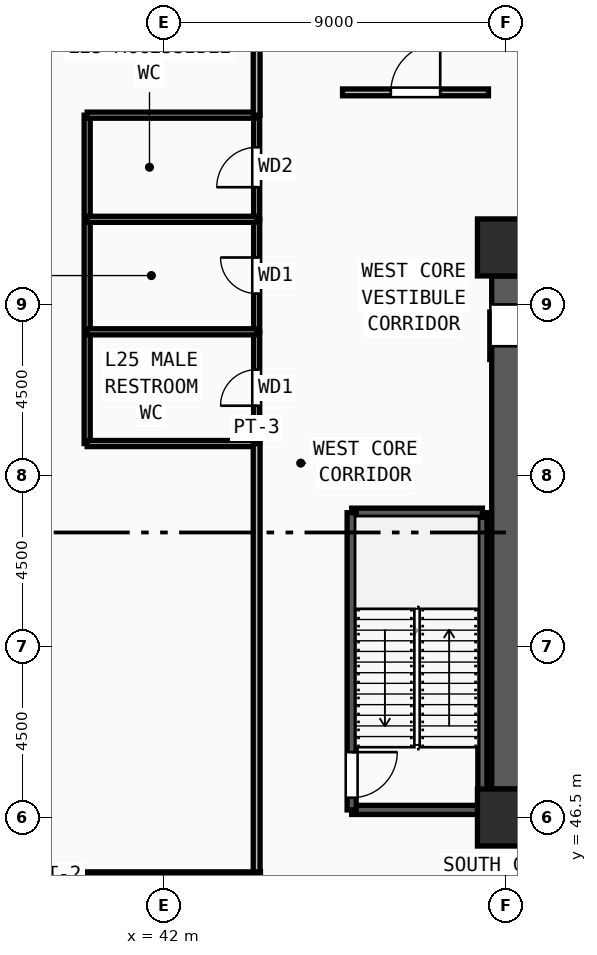
"""IFC4 building model, lengths in metres.
Left out: names, types, materials, properties, quantities, classifications, styles, units other than length and angle.
Written with IfcOpenShell. Run it as: python <this file> out.ifc"""

import sys

from ifc_helpers import new_model, si_unit, direction, frame, frame_2d, origin, origin_2d, place, context, subcontext, project, spatial, rectangle, extrude, source, transform, mapped, element, fill, save


model = new_model("IFC4")
c1 = context("Model", 3, precision=1e-05, world=origin(), true_north=direction((0.0, 1.0)))
c2 = subcontext(c1, "Body", "Model", "MODEL_VIEW")
j1 = project(units=[si_unit("LENGTHUNIT", "METRE"), si_unit("PLANEANGLEUNIT", "RADIAN")], contexts=[c1])
p1 = place(None, origin())
s1 = spatial("IfcSite", under=j1, at=p1, CompositionType="ELEMENT")
p2 = place(p1, origin())
s2 = spatial("IfcBuilding", under=s1, at=p2, CompositionType="ELEMENT")
p3 = place(p2, frame((0.0, 0.0, 97.5)))
s3 = spatial("IfcBuildingStorey", under=s2, at=p3, CompositionType="ELEMENT", Elevation=97.5)
m1 = source(origin(), c2, "Body", "SweptSolid", [
    extrude(rectangle(XDim=1.5, YDim=1.5, at=origin_2d()), origin(), (0.0, 0.0, 1.0), 4.5),
])
for number, where, z_axis, x_axis in (
    (1, (51.0, 46.5, 0.0), (0.0, 0.0, 1.0), (1.0, 0.0, 0.0)),
    (2, (51.0, 61.5, 0.0), (0.0, 0.0, 1.0), (1.0, 0.0, 0.0)),
):
    element("IfcColumn", number, at=place(p3, frame(where, z_axis=z_axis, x_axis=x_axis)), inside=s3, PredefinedType="COLUMN", context=c2, shape_type="MappedRepresentation", body=[
        mapped(m1, transform((0.0, 0.0, 0.0), x_axis=(1.0, 0.0, 0.0), y_axis=(0.0, 1.0, 0.0), z_axis=(0.0, 0.0, 1.0), scale=1.0)),
    ])
p4 = place(p3, frame((51.0, 47.25, 0.0), z_axis=(0.0, 0.0, 1.0), x_axis=(0.0, 1.0, 0.0)))
e3 = element("IfcWall", 3, at=p4, inside=s3, PredefinedType="SHEAR", context=c2, shape_type="SweptSolid", body=[
    extrude(rectangle(XDim=13.5, YDim=0.75, at=frame_2d((6.75, 0.0))), origin(), (0.0, 0.0, 1.0), 4.32),
])
m2 = source(origin(), c2, "Body", "SweptSolid", [
    extrude(rectangle(XDim=1.1, YDim=2.2, at=frame_2d((0.55, 1.1))), frame((0.0, 0.385, 0.0), z_axis=(0.0, -1.0, 0.0), x_axis=(1.0, 0.0, 0.0)), (0.0, 0.0, 1.0), 0.77),
])
p5 = place(p4, frame((11.65, 0.0, 0.0)))
e4 = element("IfcOpeningElement", 4, at=p5, cuts=e3, PredefinedType="OPENING", context=c2, shape_type="MappedRepresentation", body=[
    mapped(m2, transform((0.0, 0.0, 0.0), x_axis=(1.0, 0.0, 0.0), y_axis=(0.0, 1.0, 0.0), z_axis=(0.0, 0.0, 1.0), scale=1.0)),
])
p6 = place(p3, frame((46.94, 46.7, 0.0), z_axis=(0.0, 0.0, 1.0), x_axis=(1.0, 0.0, 0.0)))
e5 = element("IfcWall", 5, at=p6, inside=s3, PredefinedType="SOLIDWALL", context=c2, shape_type="SweptSolid", body=[
    extrude(rectangle(XDim=3.44, YDim=0.24, at=frame_2d((1.72, 0.0))), origin(), (0.0, 0.0, 1.0), 4.32),
])
p7 = place(p3, frame((50.38, 46.7, 0.0), z_axis=(0.0, 0.0, 1.0), x_axis=(0.0, 1.0, 0.0)))
e6 = element("IfcWall", 6, at=p7, inside=s3, PredefinedType="SOLIDWALL", context=c2, shape_type="SweptSolid", body=[
    extrude(rectangle(XDim=7.82, YDim=0.24, at=frame_2d((3.91, 0.0))), origin(), (0.0, 0.0, 1.0), 4.32),
])
p8 = place(p3, frame((50.38, 54.52, 0.0), z_axis=(0.0, 0.0, 1.0), x_axis=(-1.0, 0.0, 0.0)))
e7 = element("IfcWall", 7, at=p8, inside=s3, PredefinedType="SOLIDWALL", context=c2, shape_type="SweptSolid", body=[
    extrude(rectangle(XDim=3.44, YDim=0.24, at=frame_2d((1.72, 0.0))), origin(), (0.0, 0.0, 1.0), 4.32),
])
p9 = place(p3, frame((46.94, 54.52, 0.0), z_axis=(0.0, 0.0, 1.0), x_axis=(0.0, -1.0, 0.0)))
e8 = element("IfcWall", 8, at=p9, inside=s3, PredefinedType="SOLIDWALL", context=c2, shape_type="SweptSolid", body=[
    extrude(rectangle(XDim=7.82, YDim=0.24, at=frame_2d((3.91, 0.0))), origin(), (0.0, 0.0, 1.0), 4.32),
])
m3 = source(origin(), c2, "Body", "SweptSolid", [
    extrude(rectangle(XDim=1.2, YDim=2.2, at=frame_2d((0.6, 1.1))), frame((0.0, 0.13, 0.0), z_axis=(0.0, -1.0, 0.0), x_axis=(1.0, 0.0, 0.0)), (0.0, 0.0, 1.0), 0.26),
])
p10 = place(p9, frame((6.3, 0.0, 0.0)))
e9 = element("IfcOpeningElement", 9, at=p10, cuts=e8, PredefinedType="OPENING", context=c2, shape_type="MappedRepresentation", body=[
    mapped(m3, transform((0.0, 0.0, 0.0), x_axis=(1.0, 0.0, 0.0), y_axis=(0.0, 1.0, 0.0), z_axis=(0.0, 0.0, 1.0), scale=1.0)),
])
p11 = place(p3, frame((44.44, 56.34, 0.0), z_axis=(0.0, 0.0, 1.0), x_axis=(0.0, 1.0, 0.0)))
e10 = element("IfcWall", 10, at=p11, inside=s3, PredefinedType="PARTITIONING", context=c2, shape_type="SweptSolid", body=[
    extrude(rectangle(XDim=2.94, YDim=0.16, at=frame_2d((1.47, 0.0))), origin(), (0.0, 0.0, 1.0), 4.32),
])
m4 = source(origin(), c2, "Body", "SweptSolid", [
    extrude(rectangle(XDim=0.95, YDim=2.15, at=frame_2d((0.475, 1.075))), frame((0.0, 0.09, 0.0), z_axis=(0.0, -1.0, 0.0), x_axis=(1.0, 0.0, 0.0)), (0.0, 0.0, 1.0), 0.18),
])
p12 = place(p11, frame((0.995, 0.0, 0.0)))
e11 = element("IfcOpeningElement", 11, at=p12, cuts=e10, PredefinedType="OPENING", context=c2, shape_type="MappedRepresentation", body=[
    mapped(m4, transform((0.0, 0.0, 0.0), x_axis=(1.0, 0.0, 0.0), y_axis=(0.0, 1.0, 0.0), z_axis=(0.0, 0.0, 1.0), scale=1.0)),
])
p13 = place(p3, frame((44.44, 59.28, 0.0), z_axis=(0.0, 0.0, 1.0), x_axis=(0.0, 1.0, 0.0)))
e12 = element("IfcWall", 12, at=p13, inside=s3, PredefinedType="PARTITIONING", context=c2, shape_type="SweptSolid", body=[
    extrude(rectangle(XDim=2.96, YDim=0.16, at=frame_2d((1.48, 0.0))), origin(), (0.0, 0.0, 1.0), 4.32),
])
p14 = place(p13, frame((1.005, 0.0, 0.0)))
e13 = element("IfcOpeningElement", 13, at=p14, cuts=e12, PredefinedType="OPENING", context=c2, shape_type="MappedRepresentation", body=[
    mapped(m4, transform((0.0, 0.0, 0.0), x_axis=(1.0, 0.0, 0.0), y_axis=(0.0, 1.0, 0.0), z_axis=(0.0, 0.0, 1.0), scale=1.0)),
])
p15 = place(p3, frame((44.44, 62.24, 0.0), z_axis=(0.0, 0.0, 1.0), x_axis=(0.0, 1.0, 0.0)))
e14 = element("IfcWall", 14, at=p15, inside=s3, PredefinedType="PARTITIONING", context=c2, shape_type="SweptSolid", body=[
    extrude(rectangle(XDim=2.74, YDim=0.16, at=frame_2d((1.37, 0.0))), origin(), (0.0, 0.0, 1.0), 4.32),
])
m5 = source(origin(), c2, "Body", "SweptSolid", [
    extrude(rectangle(XDim=1.05, YDim=2.15, at=frame_2d((0.525, 1.075))), frame((0.0, 0.09, 0.0), z_axis=(0.0, -1.0, 0.0), x_axis=(1.0, 0.0, 0.0)), (0.0, 0.0, 1.0), 0.18),
])
p16 = place(p15, frame((0.845, 0.0, 0.0)))
e15 = element("IfcOpeningElement", 15, at=p16, cuts=e14, PredefinedType="OPENING", context=c2, shape_type="MappedRepresentation", body=[
    mapped(m5, transform((0.0, 0.0, 0.0), x_axis=(1.0, 0.0, 0.0), y_axis=(0.0, 1.0, 0.0), z_axis=(0.0, 0.0, 1.0), scale=1.0)),
])
p17 = place(p3, frame((46.7, 65.58, 0.0), z_axis=(0.0, 0.0, 1.0), x_axis=(1.0, 0.0, 0.0)))
e16 = element("IfcWall", 16, at=p17, inside=s3, PredefinedType="PARTITIONING", context=c2, shape_type="SweptSolid", body=[
    extrude(rectangle(XDim=3.84, YDim=0.18, at=frame_2d((1.92, 0.0))), origin(), (0.0, 0.0, 1.0), 4.32),
])
m6 = source(origin(), c2, "Body", "SweptSolid", [
    extrude(rectangle(XDim=1.3, YDim=2.2, at=frame_2d((0.65, 1.1))), frame((0.0, 0.1, 0.0), z_axis=(0.0, -1.0, 0.0), x_axis=(1.0, 0.0, 0.0)), (0.0, 0.0, 1.0), 0.2),
])
p18 = place(p17, frame((1.27, 0.0, 0.0)))
e17 = element("IfcOpeningElement", 17, at=p18, cuts=e16, PredefinedType="OPENING", context=c2, shape_type="MappedRepresentation", body=[
    mapped(m6, transform((0.0, 0.0, 0.0), x_axis=(1.0, 0.0, 0.0), y_axis=(0.0, 1.0, 0.0), z_axis=(0.0, 0.0, 1.0), scale=1.0)),
])
p19 = place(p3, frame((39.98, 56.34, 0.0), z_axis=(0.0, 0.0, 1.0), x_axis=(0.0, 1.0, 0.0)))
e18 = element("IfcWall", 18, at=p19, inside=s3, PredefinedType="PARTITIONING", context=c2, shape_type="SweptSolid", body=[
    extrude(rectangle(XDim=8.64, YDim=0.16, at=frame_2d((4.32, 0.0))), origin(), (0.0, 0.0, 1.0), 4.32),
])
for number, where, z_axis, x_axis in (
    (19, (39.98, 56.34, 0.0), (0.0, 0.0, 1.0), (1.0, 0.0, 0.0)),
    (20, (39.98, 59.28, 0.0), (0.0, 0.0, 1.0), (1.0, 0.0, 0.0)),
    (21, (39.98, 62.24, 0.0), (0.0, 0.0, 1.0), (1.0, 0.0, 0.0)),
    (22, (39.98, 64.98, 0.0), (0.0, 0.0, 1.0), (1.0, 0.0, 0.0)),
):
    element("IfcWall", number, at=place(p3, frame(where, z_axis=z_axis, x_axis=x_axis)), inside=s3, PredefinedType="PARTITIONING", context=c2, shape_type="SweptSolid", body=[
        extrude(rectangle(XDim=4.46, YDim=0.16, at=frame_2d((2.23, 0.0))), origin(), (0.0, 0.0, 1.0), 4.32),
    ])
p20 = place(p3, frame((44.44, 44.785, 0.0), z_axis=(0.0, 0.0, 1.0), x_axis=(0.0, 1.0, 0.0)))
e23 = element("IfcWall", 23, at=p20, inside=s3, PredefinedType="PARTITIONING", context=c2, shape_type="SweptSolid", body=[
    extrude(rectangle(XDim=11.555, YDim=0.18, at=frame_2d((5.778, 0.0))), origin(), (0.0, 0.0, 1.0), 4.32),
])
p21 = place(p3, frame((44.44, 64.98, 0.0), z_axis=(0.0, 0.0, 1.0), x_axis=(0.0, 1.0, 0.0)))
e24 = element("IfcWall", 24, at=p21, inside=s3, PredefinedType="PARTITIONING", context=c2, shape_type="SweptSolid", body=[
    extrude(rectangle(XDim=3.0, YDim=0.18, at=frame_2d((1.5, 0.0))), origin(), (0.0, 0.0, 1.0), 4.32),
])
p22 = place(p3, frame((44.54, 45.0, 0.0), z_axis=(0.0, 0.0, 1.0), x_axis=(-1.0, 0.0, 0.0)))
e25 = element("IfcWall", 25, at=p22, inside=s3, PredefinedType="PARTITIONING", context=c2, shape_type="SweptSolid", body=[
    extrude(rectangle(XDim=10.65, YDim=0.14, at=frame_2d((5.325, 0.0))), origin(), (0.0, 0.0, 1.0), 4.32),
])
m7 = source(origin(), c2, "Body", "SweptSolid", [
    extrude(rectangle(XDim=1.2, YDim=2.2, at=frame_2d((0.6, 1.1))), frame((0.0, 0.025, 0.0), z_axis=(0.0, -1.0, 0.0), x_axis=(1.0, 0.0, 0.0)), (0.0, 0.0, 1.0), 0.05),
])
p23 = place(p10, origin())
e26 = element("IfcDoor", 26, at=p23, inside=s3, OperationType="SINGLE_SWING_LEFT", PredefinedType="DOOR", context=c2, shape_type="MappedRepresentation", body=[
    mapped(m7, transform((0.0, 0.0, 0.0), x_axis=(1.0, 0.0, 0.0), y_axis=(0.0, 1.0, 0.0), z_axis=(0.0, 0.0, 1.0), scale=1.0)),
])
fill(e9, e26)
m8 = source(origin(), c2, "Body", "SweptSolid", [
    extrude(rectangle(XDim=1.1, YDim=2.2, at=frame_2d((0.55, 1.1))), frame((0.0, 0.025, 0.0), z_axis=(0.0, -1.0, 0.0), x_axis=(1.0, 0.0, 0.0)), (0.0, 0.0, 1.0), 0.05),
])
p24 = place(p5, origin())
e27 = element("IfcDoor", 27, at=p24, inside=s3, OperationType="SLIDING_TO_LEFT", PredefinedType="DOOR", context=c2, shape_type="MappedRepresentation", body=[
    mapped(m8, transform((0.0, 0.0, 0.0), x_axis=(1.0, 0.0, 0.0), y_axis=(0.0, 1.0, 0.0), z_axis=(0.0, 0.0, 1.0), scale=1.0)),
])
fill(e4, e27)
m9 = source(origin(), c2, "Body", "SweptSolid", [
    extrude(rectangle(XDim=0.95, YDim=2.15, at=frame_2d((0.475, 1.075))), frame((0.0, 0.025, 0.0), z_axis=(0.0, -1.0, 0.0), x_axis=(1.0, 0.0, 0.0)), (0.0, 0.0, 1.0), 0.05),
])
p25 = place(p12, origin())
e28 = element("IfcDoor", 28, at=p25, inside=s3, OperationType="SINGLE_SWING_LEFT", PredefinedType="DOOR", context=c2, shape_type="MappedRepresentation", body=[
    mapped(m9, transform((0.0, 0.0, 0.0), x_axis=(1.0, 0.0, 0.0), y_axis=(0.0, 1.0, 0.0), z_axis=(0.0, 0.0, 1.0), scale=1.0)),
])
fill(e11, e28)
p26 = place(p14, origin())
e29 = element("IfcDoor", 29, at=p26, inside=s3, OperationType="SINGLE_SWING_RIGHT", PredefinedType="DOOR", context=c2, shape_type="MappedRepresentation", body=[
    mapped(m9, transform((0.0, 0.0, 0.0), x_axis=(1.0, 0.0, 0.0), y_axis=(0.0, 1.0, 0.0), z_axis=(0.0, 0.0, 1.0), scale=1.0)),
])
fill(e13, e29)
m10 = source(origin(), c2, "Body", "SweptSolid", [
    extrude(rectangle(XDim=1.05, YDim=2.15, at=frame_2d((0.525, 1.075))), frame((0.0, 0.025, 0.0), z_axis=(0.0, -1.0, 0.0), x_axis=(1.0, 0.0, 0.0)), (0.0, 0.0, 1.0), 0.05),
])
p27 = place(p16, origin())
e30 = element("IfcDoor", 30, at=p27, inside=s3, OperationType="SINGLE_SWING_LEFT", PredefinedType="DOOR", context=c2, shape_type="MappedRepresentation", body=[
    mapped(m10, transform((0.0, 0.0, 0.0), x_axis=(1.0, 0.0, 0.0), y_axis=(0.0, 1.0, 0.0), z_axis=(0.0, 0.0, 1.0), scale=1.0)),
])
fill(e15, e30)
m11 = source(origin(), c2, "Body", "SweptSolid", [
    extrude(rectangle(XDim=1.3, YDim=2.2, at=frame_2d((0.65, 1.1))), frame((0.0, 0.025, 0.0), z_axis=(0.0, -1.0, 0.0), x_axis=(1.0, 0.0, 0.0)), (0.0, 0.0, 1.0), 0.05),
])
p28 = place(p18, origin())
e31 = element("IfcDoor", 31, at=p28, inside=s3, OperationType="SINGLE_SWING_RIGHT", PredefinedType="DOOR", context=c2, shape_type="MappedRepresentation", body=[
    mapped(m11, transform((0.0, 0.0, 0.0), x_axis=(1.0, 0.0, 0.0), y_axis=(0.0, 1.0, 0.0), z_axis=(0.0, 0.0, 1.0), scale=1.0)),
])
fill(e17, e31)
save(model, sys.argv[1])
